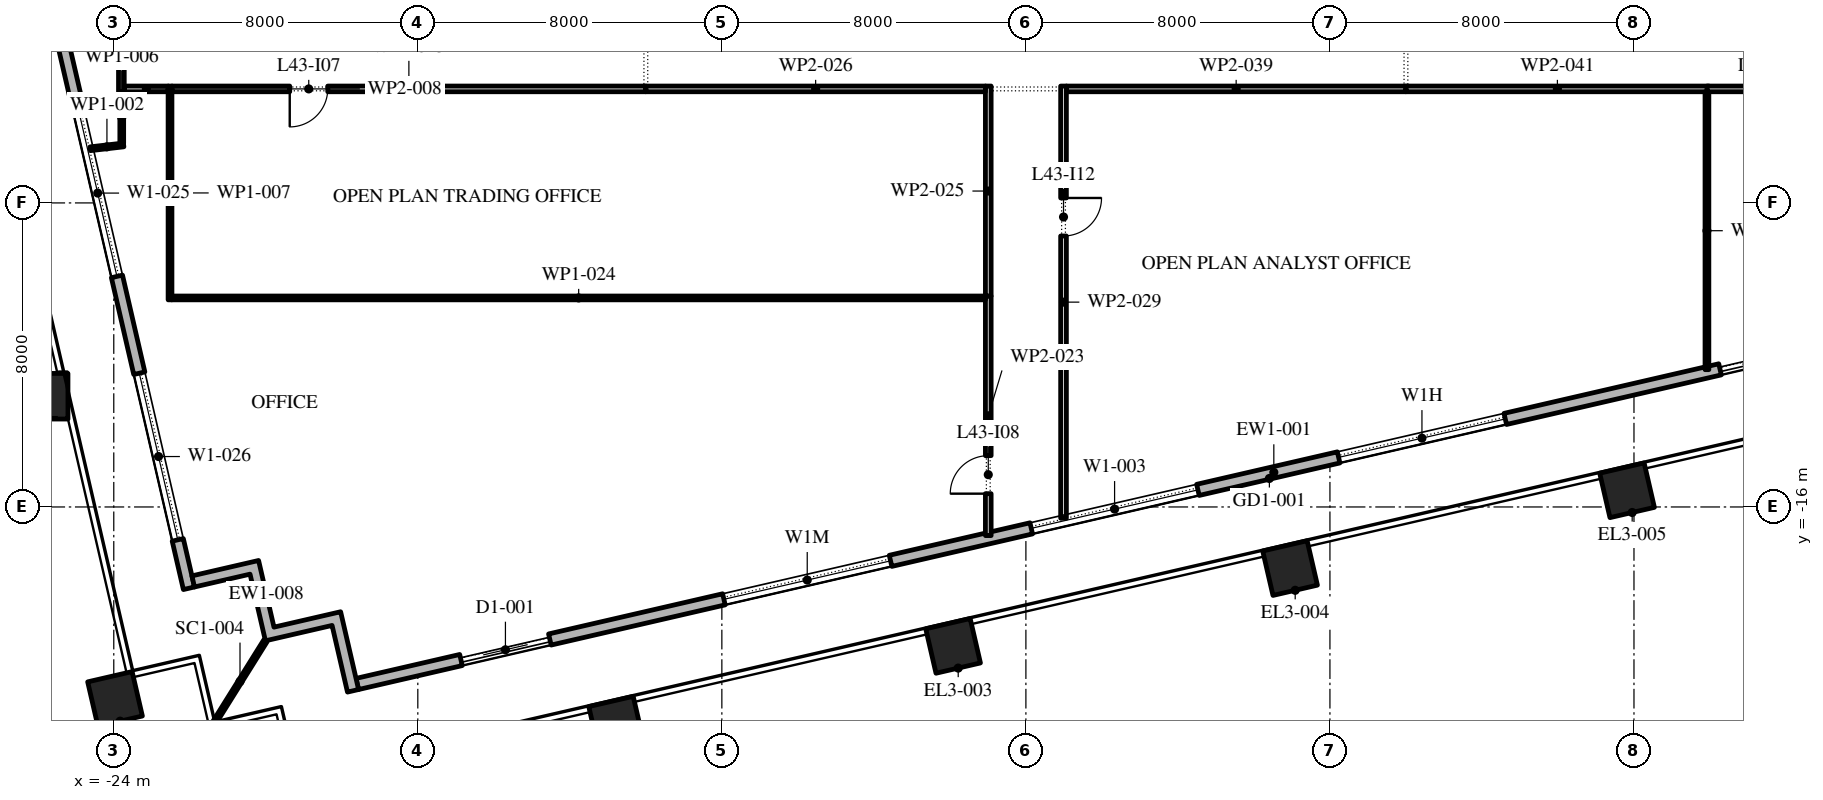
"""IFC4 building model, lengths in metres.
Left out: names, types, materials, properties, quantities, classifications, styles, units other than length and angle.
Written with IfcOpenShell. Run it as: python <this file> out.ifc"""

import sys

from ifc_helpers import new_model, si_unit, direction, frame, frame_2d, origin, origin_2d, place, context, subcontext, project, spatial, polyline, rectangle, outline, extrude, element, fill, save


model = new_model("IFC4")
c1 = context("Model", 3, precision=1e-05, world=origin(), true_north=direction((0.0, 1.0)))
c2 = subcontext(c1, "Body", "Model", "MODEL_VIEW")
j1 = project(units=[si_unit("LENGTHUNIT", "METRE"), si_unit("PLANEANGLEUNIT", "RADIAN")], contexts=[c1])
p1 = place(None, origin())
s1 = spatial("IfcSite", under=j1, at=p1, CompositionType="ELEMENT")
p2 = place(p1, origin())
s2 = spatial("IfcBuilding", under=s1, at=p2, CompositionType="ELEMENT")
p3 = place(p2, frame((0.0, 0.0, 196.8)))
s3 = spatial("IfcBuildingStorey", under=s2, at=p3, CompositionType="ELEMENT", Elevation=196.8)
for number, where, z_axis, x_axis in (
    (1, (-10.782, -21.702, 0.0), (0.0, 0.0, 1.0), (0.974, 0.225, 0.0)),
    (2, (-1.916, -19.655, 0.0), (0.0, 0.0, 1.0), (0.974, 0.225, 0.0)),
    (3, (6.951, -17.608, 0.0), (0.0, 0.0, 1.0), (0.974, 0.225, 0.0)),
    (4, (15.818, -15.561, 0.0), (0.0, 0.0, 1.0), (0.974, 0.225, 0.0)),
):
    element("IfcColumn", number, at=place(p3, frame(where, z_axis=z_axis, x_axis=x_axis)), inside=s3, PredefinedType="COLUMN", context=c2, shape_type="SweptSolid", body=[
        extrude(rectangle(XDim=1.2, YDim=1.2, at=origin_2d()), origin(), (0.0, 0.0, 1.0), 4.2),
    ])
p4 = place(p3, frame((-25.806, -13.086, 0.0), z_axis=(-0.002731884952, 0.01168316756, 0.999928017609), x_axis=(-0.973733900744, -0.227689021567, 0.0)))
e5 = element("IfcColumn", 5, at=p4, inside=s3, PredefinedType="COLUMN", context=c2, shape_type="SweptSolid", body=[
    extrude(rectangle(XDim=1.2, YDim=1.2, at=origin_2d()), origin(), (0.0, 0.0, 1.0), 4.2),
])
p5 = place(p3, frame((-23.967, -21.051, 0.0), z_axis=(0.0, 0.0, 1.0), x_axis=(0.974370064785, 0.224951054344, 0.0)))
e6 = element("IfcColumn", 6, at=p5, inside=s3, PredefinedType="COLUMN", context=c2, shape_type="SweptSolid", body=[
    extrude(rectangle(XDim=1.2, YDim=1.2, at=origin_2d()), origin(), (0.0, 0.0, 1.0), 4.2),
])
p6 = place(p3, frame((-17.592, -20.657, 0.0), z_axis=(0.0, 0.0, 1.0), x_axis=(0.974370243697, 0.224950279389, 0.0)))
e7 = element("IfcWall", 7, at=p6, inside=s3, PredefinedType="STANDARD", context=c2, shape_type="SweptSolid", body=[
    extrude(rectangle(XDim=49.5, YDim=0.3, at=frame_2d((24.75, 0.0))), origin(), (0.0, 0.0, 1.0), 4.0),
])
p7 = place(p6, frame((2.8, 0.0, 0.0)))
e8 = element("IfcOpeningElement", 8, at=p7, cuts=e7, PredefinedType="OPENING", context=c2, shape_type="SweptSolid", body=[
    extrude(rectangle(XDim=2.4, YDim=3.5, at=frame_2d((1.2, 1.75))), frame((0.0, 0.16, 0.0), z_axis=(0.0, -1.0, 0.0), x_axis=(1.0, 0.0, 0.0)), (0.0, 0.0, 1.0), 0.32),
])
p8 = place(p6, frame((9.9, 0.0, 0.45)))
e9 = element("IfcOpeningElement", 9, at=p8, cuts=e7, PredefinedType="OPENING", context=c2, shape_type="SweptSolid", body=[
    extrude(rectangle(XDim=4.5, YDim=2.575, at=frame_2d((2.25, 1.288))), frame((0.0, 0.16, 0.0), z_axis=(0.0, -1.0, 0.0), x_axis=(1.0, 0.0, 0.0)), (0.0, 0.0, 1.0), 0.32),
])
p9 = place(p6, frame((18.2, 0.0, 0.45)))
e10 = element("IfcOpeningElement", 10, at=p9, cuts=e7, PredefinedType="OPENING", context=c2, shape_type="SweptSolid", body=[
    extrude(rectangle(XDim=4.5, YDim=3.05, at=frame_2d((2.25, 1.525))), frame((0.0, 0.16, 0.0), z_axis=(0.0, -1.0, 0.0), x_axis=(1.0, 0.0, 0.0)), (0.0, 0.0, 1.0), 0.32),
])
p10 = place(p6, frame((26.5, 0.0, 0.45)))
e11 = element("IfcOpeningElement", 11, at=p10, cuts=e7, PredefinedType="OPENING", context=c2, shape_type="SweptSolid", body=[
    extrude(rectangle(XDim=4.5, YDim=2.75, at=frame_2d((2.25, 1.375))), frame((0.0, 0.16, 0.0), z_axis=(0.0, -1.0, 0.0), x_axis=(1.0, 0.0, 0.0)), (0.0, 0.0, 1.0), 0.32),
])
p11 = place(p6, frame((36.8, 0.0, 0.0)))
e12 = element("IfcOpeningElement", 12, at=p11, cuts=e7, PredefinedType="OPENING", context=c2, shape_type="SweptSolid", body=[
    extrude(rectangle(XDim=2.4, YDim=3.275, at=frame_2d((1.2, 1.637))), frame((0.0, 0.16, 0.0), z_axis=(0.0, -1.0, 0.0), x_axis=(1.0, 0.0, 0.0)), (0.0, 0.0, 1.0), 0.32),
])
p12 = place(p6, frame((43.1, 0.0, 0.45)))
e13 = element("IfcOpeningElement", 13, at=p12, cuts=e7, PredefinedType="OPENING", context=c2, shape_type="SweptSolid", body=[
    extrude(rectangle(XDim=4.5, YDim=2.875, at=frame_2d((2.25, 1.438))), frame((0.0, 0.16, 0.0), z_axis=(0.0, -1.0, 0.0), x_axis=(1.0, 0.0, 0.0)), (0.0, 0.0, 1.0), 0.32),
])
p13 = place(p3, frame((-33.157, 30.092, 0.0), z_axis=(0.0, 0.0, 1.0), x_axis=(0.224950279389, -0.974370243697, 0.0)))
e14 = element("IfcWall", 14, at=p13, inside=s3, PredefinedType="STANDARD", context=c2, shape_type="SweptSolid", body=[
    extrude(rectangle(XDim=49.5, YDim=0.3, at=frame_2d((24.75, 0.0))), origin(), (0.0, 0.0, 1.0), 4.0),
])
p14 = place(p13, frame((2.207, 0.0, 0.0)))
e15 = element("IfcOpeningElement", 15, at=p14, cuts=e14, PredefinedType="OPENING", context=c2, shape_type="SweptSolid", body=[
    extrude(rectangle(XDim=2.4, YDim=3.5, at=frame_2d((1.2, 1.75))), frame((0.0, 0.16, 0.0), z_axis=(0.0, -1.0, 0.0), x_axis=(1.0, 0.0, 0.0)), (0.0, 0.0, 1.0), 0.32),
])
p15 = place(p13, frame((8.121, 0.0, 0.45)))
e16 = element("IfcOpeningElement", 16, at=p15, cuts=e14, PredefinedType="OPENING", context=c2, shape_type="SweptSolid", body=[
    extrude(rectangle(XDim=4.5, YDim=2.825, at=frame_2d((2.25, 1.413))), frame((0.0, 0.16, 0.0), z_axis=(0.0, -1.0, 0.0), x_axis=(1.0, 0.0, 0.0)), (0.0, 0.0, 1.0), 0.32),
])
p16 = place(p13, frame((15.236, 0.0, 0.45)))
e17 = element("IfcOpeningElement", 17, at=p16, cuts=e14, PredefinedType="OPENING", context=c2, shape_type="SweptSolid", body=[
    extrude(rectangle(XDim=4.5, YDim=2.95, at=frame_2d((2.25, 1.475))), frame((0.0, 0.16, 0.0), z_axis=(0.0, -1.0, 0.0), x_axis=(1.0, 0.0, 0.0)), (0.0, 0.0, 1.0), 0.32),
])
p17 = place(p13, frame((22.35, 0.0, 0.45)))
e18 = element("IfcOpeningElement", 18, at=p17, cuts=e14, PredefinedType="OPENING", context=c2, shape_type="SweptSolid", body=[
    extrude(rectangle(XDim=4.5, YDim=3.0, at=frame_2d((2.25, 1.5))), frame((0.0, 0.16, 0.0), z_axis=(0.0, -1.0, 0.0), x_axis=(1.0, 0.0, 0.0)), (0.0, 0.0, 1.0), 0.32),
])
p18 = place(p13, frame((30.514, 0.0, 0.0)))
e19 = element("IfcOpeningElement", 19, at=p18, cuts=e14, PredefinedType="OPENING", context=c2, shape_type="SweptSolid", body=[
    extrude(rectangle(XDim=2.4, YDim=3.5, at=frame_2d((1.2, 1.75))), frame((0.0, 0.16, 0.0), z_axis=(0.0, -1.0, 0.0), x_axis=(1.0, 0.0, 0.0)), (0.0, 0.0, 1.0), 0.32),
])
p19 = place(p13, frame((36.579, 0.0, 0.45)))
e20 = element("IfcOpeningElement", 20, at=p19, cuts=e14, PredefinedType="OPENING", context=c2, shape_type="SweptSolid", body=[
    extrude(rectangle(XDim=4.5, YDim=3.05, at=frame_2d((2.25, 1.525))), frame((0.0, 0.16, 0.0), z_axis=(0.0, -1.0, 0.0), x_axis=(1.0, 0.0, 0.0)), (0.0, 0.0, 1.0), 0.32),
])
p20 = place(p13, frame((43.693, 0.0, 0.45)))
e21 = element("IfcOpeningElement", 21, at=p20, cuts=e14, PredefinedType="OPENING", context=c2, shape_type="SweptSolid", body=[
    extrude(rectangle(XDim=4.5, YDim=3.05, at=frame_2d((2.25, 1.525))), frame((0.0, 0.16, 0.0), z_axis=(0.0, -1.0, 0.0), x_axis=(1.0, 0.0, 0.0)), (0.0, 0.0, 1.0), 0.32),
])
p21 = place(p3, origin())
e22 = element("IfcWall", 22, at=p21, inside=s3, PredefinedType="STANDARD", context=c2, shape_type="SweptSolid", body=[
    extrude(outline(polyline([(-18.256, -19.117), (-20.01, -19.522), (-20.414, -17.768), (-21.876, -18.105), (-21.943, -17.813), (-20.19, -17.408), (-19.785, -19.162), (-18.031, -18.757), (-17.558, -20.803), (-17.851, -20.871), (-18.256, -19.117)])), origin(), (0.0, 0.0, 1.0), 4.0),
])
p22 = place(p3, frame((-20.01, -19.522, -0.05), z_axis=(0.0, 0.0, 1.0), x_axis=(-0.529920736377, -0.848047176257, 0.0)))
e23 = element("IfcWall", 23, at=p22, inside=s3, PredefinedType="STANDARD", context=c2, shape_type="SweptSolid", body=[
    extrude(rectangle(XDim=2.526, YDim=0.1, at=frame_2d((1.263, 0.0))), origin(), (0.0, 0.0, 1.0), 4.05),
])
p23 = place(p3, frame((-24.62, -6.575, 0.0), z_axis=(0.0, 0.0, 1.0), x_axis=(0.993501545499, 0.113818623659, 0.0)))
e24 = element("IfcWall", 24, at=p23, inside=s3, PredefinedType="PARTITIONING", context=c2, shape_type="SweptSolid", body=[
    extrude(rectangle(XDim=0.886, YDim=0.1, at=frame_2d((0.443, 0.0))), origin(), (0.0, 0.0, 1.0), 4.0),
])
p24 = place(p3, frame((-23.8, -5.075, 0.0), z_axis=(0.0, 0.0, 1.0), x_axis=(0.0, 1.0, 0.0)))
e25 = element("IfcWall", 25, at=p24, inside=s3, PredefinedType="PARTITIONING", context=c2, shape_type="SweptSolid", body=[
    extrude(rectangle(XDim=27.335, YDim=0.15, at=frame_2d((13.667, 0.0))), origin(), (0.0, 0.0, 1.0), 4.0),
])
p25 = place(p24, frame((15.985, 0.0, 0.0)))
e26 = element("IfcOpeningElement", 26, at=p25, cuts=e25, PredefinedType="OPENING", context=c2, shape_type="SweptSolid", body=[
    extrude(rectangle(XDim=1.0, YDim=2.1, at=frame_2d((0.5, 1.05))), frame((0.0, 0.085, 0.0), z_axis=(0.0, -1.0, 0.0), x_axis=(1.0, 0.0, 0.0)), (0.0, 0.0, 1.0), 0.17),
])
p26 = place(p3, frame((-23.79, -5.075, 0.0), z_axis=(0.0, 0.0, 1.0), x_axis=(0.0, -1.0, 0.0)))
e27 = element("IfcWall", 27, at=p26, inside=s3, PredefinedType="PARTITIONING", context=c2, shape_type="SweptSolid", body=[
    extrude(rectangle(XDim=1.355, YDim=0.1, at=frame_2d((0.677, 0.0))), origin(), (0.0, 0.0, 1.0), 4.0),
])
p27 = place(p3, frame((-22.52, -10.55, 0.0), z_axis=(0.0, 0.0, 1.0), x_axis=(0.0, 1.0, 0.0)))
e28 = element("IfcWall", 28, at=p27, inside=s3, PredefinedType="PARTITIONING", context=c2, shape_type="SweptSolid", body=[
    extrude(rectangle(XDim=5.625, YDim=0.1, at=frame_2d((2.812, 0.0))), origin(), (0.0, 0.0, 1.0), 4.0),
])
p28 = place(p3, frame((-22.57, -5.0, 0.0), z_axis=(0.0, 0.0, 1.0), x_axis=(-1.0, 0.0, 0.0)))
e29 = element("IfcWall", 29, at=p28, inside=s3, PredefinedType="PARTITIONING", context=c2, shape_type="SweptSolid", body=[
    extrude(rectangle(XDim=1.145, YDim=0.15, at=frame_2d((0.573, 0.0))), origin(), (0.0, 0.0, 1.0), 4.0),
])
p29 = place(p3, frame((-10.0, -5.0, 0.0), z_axis=(0.0, 0.0, 1.0), x_axis=(-1.0, 0.0, 0.0)))
e30 = element("IfcWall", 30, at=p29, inside=s3, PredefinedType="PARTITIONING", context=c2, shape_type="SweptSolid", body=[
    extrude(rectangle(XDim=12.47, YDim=0.15, at=frame_2d((6.235, 0.0))), origin(), (0.0, 0.0, 1.0), 4.0),
])
p30 = place(p29, frame((8.37, 0.0, 0.0)))
e31 = element("IfcOpeningElement", 31, at=p30, cuts=e30, PredefinedType="OPENING", context=c2, shape_type="SweptSolid", body=[
    extrude(rectangle(XDim=1.0, YDim=2.1, at=frame_2d((0.5, 1.05))), frame((0.0, 0.085, 0.0), z_axis=(0.0, -1.0, 0.0), x_axis=(1.0, 0.0, 0.0)), (0.0, 0.0, 1.0), 0.17),
])
p31 = place(p3, frame((-0.99, -16.753, 0.0), z_axis=(0.0, 0.0, 1.0), x_axis=(0.0, 1.0, 0.0)))
e32 = element("IfcWall", 32, at=p31, inside=s3, PredefinedType="PARTITIONING", context=c2, shape_type="SweptSolid", body=[
    extrude(rectangle(XDim=6.303, YDim=0.15, at=frame_2d((3.151, 0.0))), origin(), (0.0, 0.0, 1.0), 4.0),
])
p32 = place(p31, frame((1.103, 0.0, 0.0)))
e33 = element("IfcOpeningElement", 33, at=p32, cuts=e32, PredefinedType="OPENING", context=c2, shape_type="SweptSolid", body=[
    extrude(rectangle(XDim=1.0, YDim=2.1, at=frame_2d((0.5, 1.05))), frame((0.0, 0.085, 0.0), z_axis=(0.0, -1.0, 0.0), x_axis=(1.0, 0.0, 0.0)), (0.0, 0.0, 1.0), 0.17),
])
p33 = place(p3, frame((-1.065, -10.5, 0.0), z_axis=(0.0, 0.0, 1.0), x_axis=(-1.0, 0.0, 0.0)))
e34 = element("IfcWall", 34, at=p33, inside=s3, PredefinedType="PARTITIONING", context=c2, shape_type="SweptSolid", body=[
    extrude(rectangle(XDim=21.405, YDim=0.1, at=frame_2d((10.703, 0.0))), origin(), (0.0, 0.0, 1.0), 4.0),
])
p34 = place(p3, frame((-0.99, -10.45, 0.0), z_axis=(0.0, 0.0, 1.0), x_axis=(0.0, 1.0, 0.0)))
e35 = element("IfcWall", 35, at=p34, inside=s3, PredefinedType="PARTITIONING", context=c2, shape_type="SweptSolid", body=[
    extrude(rectangle(XDim=5.525, YDim=0.15, at=frame_2d((2.762, 0.0))), origin(), (0.0, 0.0, 1.0), 4.0),
])
p35 = place(p3, frame((-1.065, -5.0, 0.0), z_axis=(0.0, 0.0, 1.0), x_axis=(-1.0, 0.0, 0.0)))
e36 = element("IfcWall", 36, at=p35, inside=s3, PredefinedType="PARTITIONING", context=c2, shape_type="SweptSolid", body=[
    extrude(rectangle(XDim=8.935, YDim=0.15, at=frame_2d((4.468, 0.0))), origin(), (0.0, 0.0, 1.0), 4.0),
])
p36 = place(p3, frame((0.99, -4.925, 0.0), z_axis=(0.0, 0.0, 1.0), x_axis=(0.0, -1.0, 0.0)))
e37 = element("IfcWall", 37, at=p36, inside=s3, PredefinedType="PARTITIONING", context=c2, shape_type="SweptSolid", body=[
    extrude(rectangle(XDim=11.371, YDim=0.15, at=frame_2d((5.686, 0.0))), origin(), (0.0, 0.0, 1.0), 4.0),
])
p37 = place(p36, frame((2.945, 0.0, 0.0)))
e38 = element("IfcOpeningElement", 38, at=p37, cuts=e37, PredefinedType="OPENING", context=c2, shape_type="SweptSolid", body=[
    extrude(rectangle(XDim=1.0, YDim=2.1, at=frame_2d((0.5, 1.05))), frame((0.0, 0.085, 0.0), z_axis=(0.0, -1.0, 0.0), x_axis=(1.0, 0.0, 0.0)), (0.0, 0.0, 1.0), 0.17),
])
p38 = place(p3, frame((10.0, -5.0, 0.0), z_axis=(0.0, 0.0, 1.0), x_axis=(-1.0, 0.0, 0.0)))
e39 = element("IfcWall", 39, at=p38, inside=s3, PredefinedType="PARTITIONING", context=c2, shape_type="SweptSolid", body=[
    extrude(rectangle(XDim=8.935, YDim=0.15, at=frame_2d((4.468, 0.0))), origin(), (0.0, 0.0, 1.0), 4.0),
])
p39 = place(p3, frame((17.97, -5.0, 0.0), z_axis=(0.0, 0.0, 1.0), x_axis=(-1.0, 0.0, 0.0)))
e40 = element("IfcWall", 40, at=p39, inside=s3, PredefinedType="PARTITIONING", context=c2, shape_type="SweptSolid", body=[
    extrude(rectangle(XDim=7.97, YDim=0.15, at=frame_2d((3.985, 0.0))), origin(), (0.0, 0.0, 1.0), 4.0),
])
p40 = place(p3, frame((17.92, -5.075, 0.0), z_axis=(0.0, 0.0, 1.0), x_axis=(0.0, -1.0, 0.0)))
e41 = element("IfcWall", 41, at=p40, inside=s3, PredefinedType="PARTITIONING", context=c2, shape_type="SweptSolid", body=[
    extrude(rectangle(XDim=7.312, YDim=0.1, at=frame_2d((3.656, 0.0))), origin(), (0.0, 0.0, 1.0), 4.0),
])
p41 = place(p3, frame((23.84, -5.0, 0.0), z_axis=(0.0, 0.0, 1.0), x_axis=(-1.0, 0.0, 0.0)))
e42 = element("IfcWall", 42, at=p41, inside=s3, PredefinedType="PARTITIONING", context=c2, shape_type="SweptSolid", body=[
    extrude(rectangle(XDim=5.92, YDim=0.15, at=frame_2d((2.96, 0.0))), origin(), (0.0, 0.0, 1.0), 4.0),
])
p42 = place(p41, frame((3.77, 0.0, 0.0)))
e43 = element("IfcOpeningElement", 43, at=p42, cuts=e42, PredefinedType="OPENING", context=c2, shape_type="SweptSolid", body=[
    extrude(rectangle(XDim=1.0, YDim=2.1, at=frame_2d((0.5, 1.05))), frame((0.0, 0.085, 0.0), z_axis=(0.0, -1.0, 0.0), x_axis=(1.0, 0.0, 0.0)), (0.0, 0.0, 1.0), 0.17),
])
p43 = place(p7, origin())
e44 = element("IfcDoor", 44, at=p43, inside=s3, OperationType="DOUBLE_DOOR_SLIDING", PredefinedType="DOOR", context=c2, shape_type="SweptSolid", body=[
    extrude(rectangle(XDim=2.4, YDim=3.5, at=frame_2d((1.2, 1.75))), frame((0.0, 0.025, 0.0), z_axis=(0.0, -1.0, 0.0), x_axis=(1.0, 0.0, 0.0)), (0.0, 0.0, 1.0), 0.05),
])
fill(e8, e44)
p44 = place(p8, origin())
e45 = element("IfcWindow", 45, at=p44, inside=s3, PartitioningType="DOUBLE_PANEL_VERTICAL", PredefinedType="WINDOW", context=c2, shape_type="SweptSolid", body=[
    extrude(rectangle(XDim=4.5, YDim=2.575, at=frame_2d((2.25, 1.288))), frame((0.0, 0.03, 0.0), z_axis=(0.0, -1.0, 0.0), x_axis=(1.0, 0.0, 0.0)), (0.0, 0.0, 1.0), 0.06),
])
fill(e9, e45)
p45 = place(p9, origin())
e46 = element("IfcWindow", 46, at=p45, inside=s3, PartitioningType="DOUBLE_PANEL_VERTICAL", PredefinedType="WINDOW", context=c2, shape_type="SweptSolid", body=[
    extrude(rectangle(XDim=4.5, YDim=3.05, at=frame_2d((2.25, 1.525))), frame((0.0, 0.03, 0.0), z_axis=(0.0, -1.0, 0.0), x_axis=(1.0, 0.0, 0.0)), (0.0, 0.0, 1.0), 0.06),
])
fill(e10, e46)
p46 = place(p10, origin())
e47 = element("IfcWindow", 47, at=p46, inside=s3, PartitioningType="DOUBLE_PANEL_VERTICAL", PredefinedType="WINDOW", context=c2, shape_type="SweptSolid", body=[
    extrude(rectangle(XDim=4.5, YDim=2.75, at=frame_2d((2.25, 1.375))), frame((0.0, 0.03, 0.0), z_axis=(0.0, -1.0, 0.0), x_axis=(1.0, 0.0, 0.0)), (0.0, 0.0, 1.0), 0.06),
])
fill(e11, e47)
p47 = place(p11, origin())
e48 = element("IfcDoor", 48, at=p47, inside=s3, OperationType="DOUBLE_DOOR_SLIDING", PredefinedType="DOOR", context=c2, shape_type="SweptSolid", body=[
    extrude(rectangle(XDim=2.4, YDim=3.275, at=frame_2d((1.2, 1.637))), frame((0.0, 0.025, 0.0), z_axis=(0.0, -1.0, 0.0), x_axis=(1.0, 0.0, 0.0)), (0.0, 0.0, 1.0), 0.05),
])
fill(e12, e48)
p48 = place(p19, origin())
e49 = element("IfcWindow", 49, at=p48, inside=s3, PartitioningType="DOUBLE_PANEL_VERTICAL", PredefinedType="WINDOW", context=c2, shape_type="SweptSolid", body=[
    extrude(rectangle(XDim=4.5, YDim=3.05, at=frame_2d((2.25, 1.525))), frame((0.0, 0.03, 0.0), z_axis=(0.0, -1.0, 0.0), x_axis=(1.0, 0.0, 0.0)), (0.0, 0.0, 1.0), 0.06),
])
fill(e20, e49)
p49 = place(p20, origin())
e50 = element("IfcWindow", 50, at=p49, inside=s3, PartitioningType="DOUBLE_PANEL_VERTICAL", PredefinedType="WINDOW", context=c2, shape_type="SweptSolid", body=[
    extrude(rectangle(XDim=4.5, YDim=3.05, at=frame_2d((2.25, 1.525))), frame((0.0, 0.03, 0.0), z_axis=(0.0, -1.0, 0.0), x_axis=(1.0, 0.0, 0.0)), (0.0, 0.0, 1.0), 0.06),
])
fill(e21, e50)
p50 = place(p30, origin())
e51 = element("IfcDoor", 51, at=p50, inside=s3, OperationType="SINGLE_SWING_LEFT", PredefinedType="DOOR", context=c2, shape_type="SweptSolid", body=[
    extrude(rectangle(XDim=1.0, YDim=2.1, at=frame_2d((0.5, 1.05))), frame((0.0, 0.025, 0.0), z_axis=(0.0, -1.0, 0.0), x_axis=(1.0, 0.0, 0.0)), (0.0, 0.0, 1.0), 0.05),
])
fill(e31, e51)
p51 = place(p32, origin())
e52 = element("IfcDoor", 52, at=p51, inside=s3, OperationType="SINGLE_SWING_RIGHT", PredefinedType="DOOR", context=c2, shape_type="SweptSolid", body=[
    extrude(rectangle(XDim=1.0, YDim=2.1, at=frame_2d((0.5, 1.05))), frame((0.0, 0.025, 0.0), z_axis=(0.0, -1.0, 0.0), x_axis=(1.0, 0.0, 0.0)), (0.0, 0.0, 1.0), 0.05),
])
fill(e33, e52)
p52 = place(p37, origin())
e53 = element("IfcDoor", 53, at=p52, inside=s3, OperationType="SINGLE_SWING_RIGHT", PredefinedType="DOOR", context=c2, shape_type="SweptSolid", body=[
    extrude(rectangle(XDim=1.0, YDim=2.1, at=frame_2d((0.5, 1.05))), frame((0.0, 0.025, 0.0), z_axis=(0.0, -1.0, 0.0), x_axis=(1.0, 0.0, 0.0)), (0.0, 0.0, 1.0), 0.05),
])
fill(e38, e53)
save(model, sys.argv[1])
